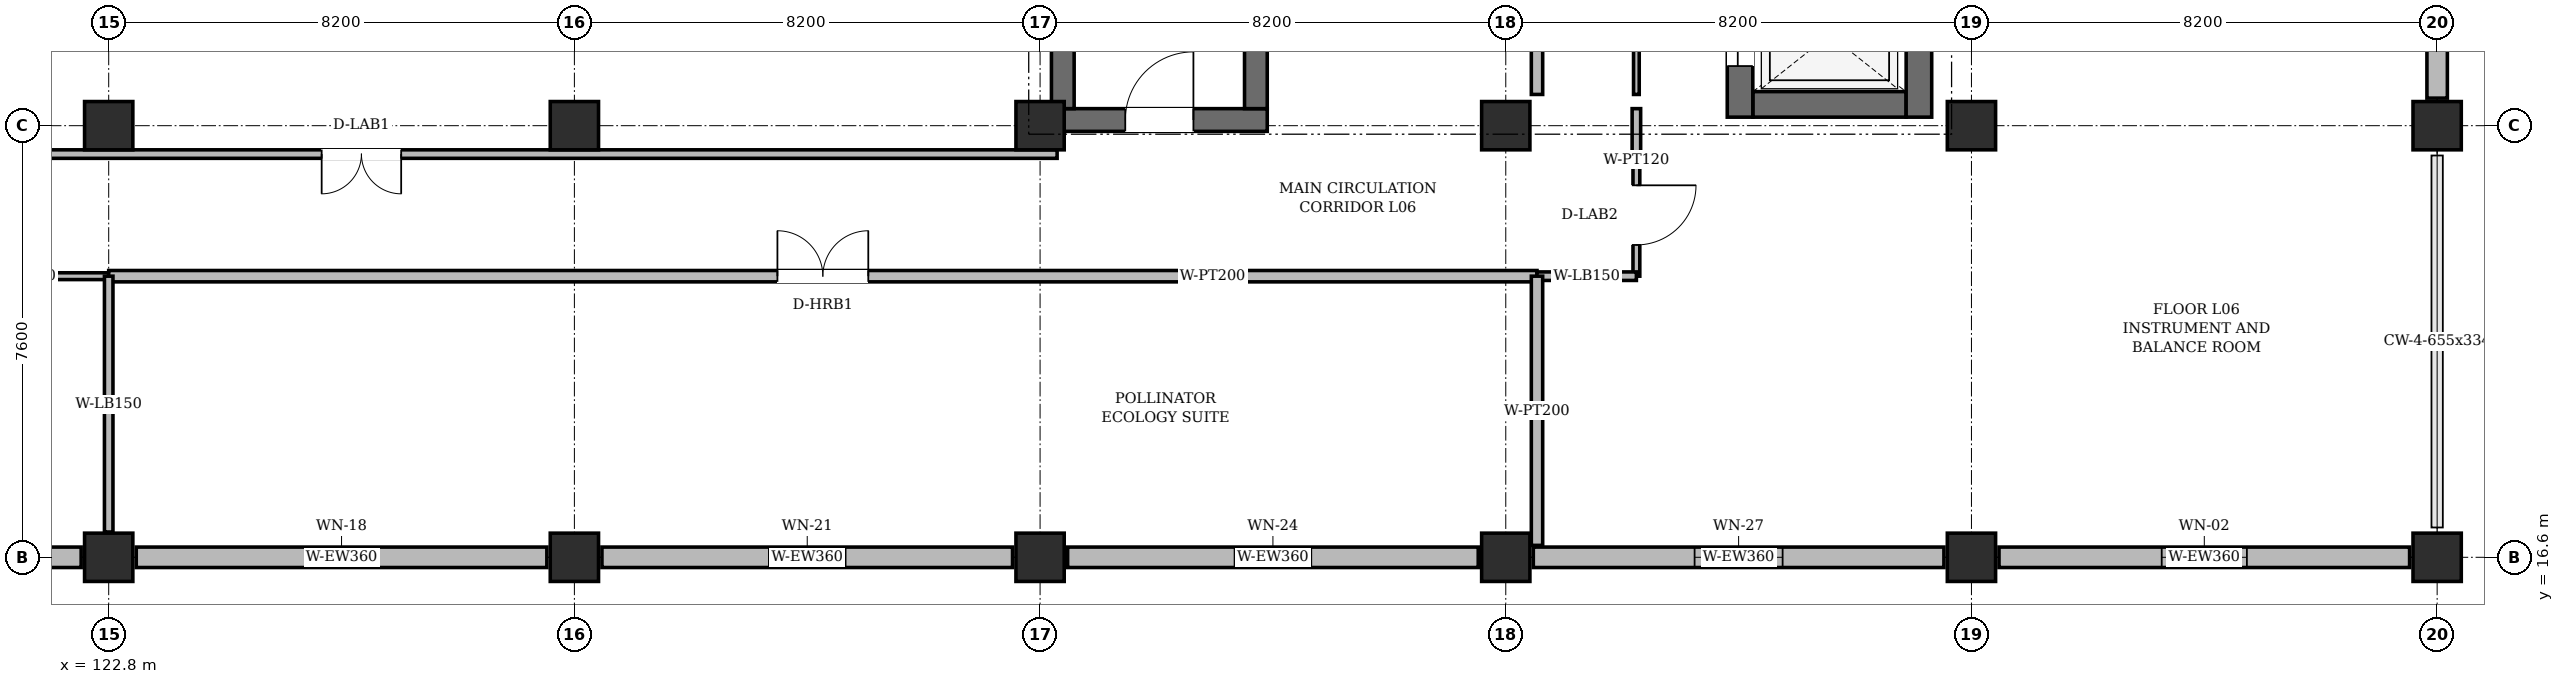
"""IFC4 building model, lengths in metres.
Left out: names, types, materials, properties, quantities, classifications, styles, units other than length and angle.
Written with IfcOpenShell. Run it as: python <this file> out.ifc"""

import sys

from ifc_helpers import new_model, si_unit, direction, frame, frame_2d, origin, origin_2d, place, context, subcontext, project, spatial, rectangle, extrude, element, fill, save


model = new_model("IFC4")
c1 = context("Model", 3, precision=1e-05, world=origin(), true_north=direction((0.0, 1.0)))
c2 = subcontext(c1, "Body", "Model", "MODEL_VIEW")
j1 = project(units=[si_unit("LENGTHUNIT", "METRE"), si_unit("PLANEANGLEUNIT", "RADIAN")], contexts=[c1])
p1 = place(None, origin())
s1 = spatial("IfcSite", under=j1, at=p1, CompositionType="ELEMENT")
p2 = place(p1, origin())
s2 = spatial("IfcBuilding", under=s1, at=p2, CompositionType="ELEMENT")
p3 = place(p2, frame((0.0, 0.0, 28.2)))
s3 = spatial("IfcBuildingStorey", under=s2, at=p3, CompositionType="ELEMENT", Elevation=28.2)
for number, where, z_axis, x_axis in (
    (1, (122.8, 16.6, 0.0), (0.0, 0.0, 1.0), (1.0, 0.0, 0.0)),
    (2, (122.8, 24.2, 0.0), (0.0, 0.0, 1.0), (1.0, 0.0, 0.0)),
    (3, (131.0, 16.6, 0.0), (0.0, 0.0, 1.0), (1.0, 0.0, 0.0)),
    (4, (131.0, 24.2, 0.0), (0.0, 0.0, 1.0), (1.0, 0.0, 0.0)),
    (5, (139.2, 16.6, 0.0), (0.0, 0.0, 1.0), (1.0, 0.0, 0.0)),
    (6, (139.2, 24.2, 0.0), (0.0, 0.0, 1.0), (1.0, 0.0, 0.0)),
    (7, (147.4, 16.6, 0.0), (0.0, 0.0, 1.0), (1.0, 0.0, 0.0)),
    (8, (147.4, 24.2, 0.0), (0.0, 0.0, 1.0), (1.0, 0.0, 0.0)),
    (9, (155.6, 16.6, 0.0), (0.0, 0.0, 1.0), (1.0, 0.0, 0.0)),
    (10, (155.6, 24.2, 0.0), (0.0, 0.0, 1.0), (1.0, 0.0, 0.0)),
    (11, (163.8, 16.6, 0.0), (0.0, 0.0, 1.0), (1.0, 0.0, 0.0)),
    (12, (163.8, 24.2, 0.0), (0.0, 0.0, 1.0), (1.0, 0.0, 0.0)),
):
    element("IfcColumn", number, at=place(p3, frame(where, z_axis=z_axis, x_axis=x_axis)), inside=s3, PredefinedType="COLUMN", context=c2, shape_type="SweptSolid", body=[
        extrude(rectangle(XDim=0.85, YDim=0.85, at=origin_2d()), origin(), (0.0, 0.0, 1.0), 3.94),
    ])
p4 = place(p3, frame((114.985, 16.6, 0.0), z_axis=(0.0, 0.0, 1.0), x_axis=(1.0, 0.0, 0.0)))
e13 = element("IfcWall", 13, at=p4, inside=s3, PredefinedType="SOLIDWALL", context=c2, shape_type="SweptSolid", body=[
    extrude(rectangle(XDim=7.33, YDim=0.36, at=frame_2d((3.665, 0.0))), origin(), (0.0, 0.0, 1.0), 3.325),
])
p5 = place(p4, frame((3.19, 0.0, 0.95)))
e14 = element("IfcOpeningElement", 14, at=p5, cuts=e13, PredefinedType="OPENING", context=c2, shape_type="SweptSolid", body=[
    extrude(rectangle(XDim=0.95, YDim=1.75, at=frame_2d((0.475, 0.875))), frame((0.0, 0.192, 0.0), z_axis=(0.0, -1.0, 0.0), x_axis=(1.0, 0.0, 0.0)), (0.0, 0.0, 1.0), 0.384),
])
p6 = place(p3, frame((123.285, 16.6, 0.0), z_axis=(0.0, 0.0, 1.0), x_axis=(1.0, 0.0, 0.0)))
e15 = element("IfcWall", 15, at=p6, inside=s3, PredefinedType="SOLIDWALL", context=c2, shape_type="SweptSolid", body=[
    extrude(rectangle(XDim=7.23, YDim=0.36, at=frame_2d((3.615, 0.0))), origin(), (0.0, 0.0, 1.0), 3.325),
])
p7 = place(p6, frame((3.04, 0.0, 0.95)))
e16 = element("IfcOpeningElement", 16, at=p7, cuts=e15, PredefinedType="OPENING", context=c2, shape_type="SweptSolid", body=[
    extrude(rectangle(XDim=1.15, YDim=1.5, at=frame_2d((0.575, 0.75))), frame((0.0, 0.192, 0.0), z_axis=(0.0, -1.0, 0.0), x_axis=(1.0, 0.0, 0.0)), (0.0, 0.0, 1.0), 0.384),
])
p8 = place(p3, frame((131.485, 16.6, 0.0), z_axis=(0.0, 0.0, 1.0), x_axis=(1.0, 0.0, 0.0)))
e17 = element("IfcWall", 17, at=p8, inside=s3, PredefinedType="SOLIDWALL", context=c2, shape_type="SweptSolid", body=[
    extrude(rectangle(XDim=7.23, YDim=0.36, at=frame_2d((3.615, 0.0))), origin(), (0.0, 0.0, 1.0), 3.325),
])
p9 = place(p8, frame((2.94, 0.0, 0.95)))
e18 = element("IfcOpeningElement", 18, at=p9, cuts=e17, PredefinedType="OPENING", context=c2, shape_type="SweptSolid", body=[
    extrude(rectangle(XDim=1.35, YDim=1.25, at=frame_2d((0.675, 0.625))), frame((0.0, 0.192, 0.0), z_axis=(0.0, -1.0, 0.0), x_axis=(1.0, 0.0, 0.0)), (0.0, 0.0, 1.0), 0.384),
])
p10 = place(p3, frame((139.685, 16.6, 0.0), z_axis=(0.0, 0.0, 1.0), x_axis=(1.0, 0.0, 0.0)))
e19 = element("IfcWall", 19, at=p10, inside=s3, PredefinedType="SOLIDWALL", context=c2, shape_type="SweptSolid", body=[
    extrude(rectangle(XDim=7.23, YDim=0.36, at=frame_2d((3.615, 0.0))), origin(), (0.0, 0.0, 1.0), 3.325),
])
p11 = place(p10, frame((2.94, 0.0, 0.95)))
e20 = element("IfcOpeningElement", 20, at=p11, cuts=e19, PredefinedType="OPENING", context=c2, shape_type="SweptSolid", body=[
    extrude(rectangle(XDim=1.35, YDim=2.05, at=frame_2d((0.675, 1.025))), frame((0.0, 0.192, 0.0), z_axis=(0.0, -1.0, 0.0), x_axis=(1.0, 0.0, 0.0)), (0.0, 0.0, 1.0), 0.384),
])
p12 = place(p3, frame((147.885, 16.6, 0.0), z_axis=(0.0, 0.0, 1.0), x_axis=(1.0, 0.0, 0.0)))
e21 = element("IfcWall", 21, at=p12, inside=s3, PredefinedType="SOLIDWALL", context=c2, shape_type="SweptSolid", body=[
    extrude(rectangle(XDim=7.23, YDim=0.36, at=frame_2d((3.615, 0.0))), origin(), (0.0, 0.0, 1.0), 3.325),
])
p13 = place(p12, frame((2.84, 0.0, 0.95)))
e22 = element("IfcOpeningElement", 22, at=p13, cuts=e21, PredefinedType="OPENING", context=c2, shape_type="SweptSolid", body=[
    extrude(rectangle(XDim=1.55, YDim=1.75, at=frame_2d((0.775, 0.875))), frame((0.0, 0.192, 0.0), z_axis=(0.0, -1.0, 0.0), x_axis=(1.0, 0.0, 0.0)), (0.0, 0.0, 1.0), 0.384),
])
p14 = place(p3, frame((156.085, 16.6, 0.0), z_axis=(0.0, 0.0, 1.0), x_axis=(1.0, 0.0, 0.0)))
e23 = element("IfcWall", 23, at=p14, inside=s3, PredefinedType="SOLIDWALL", context=c2, shape_type="SweptSolid", body=[
    extrude(rectangle(XDim=7.23, YDim=0.36, at=frame_2d((3.615, 0.0))), origin(), (0.0, 0.0, 1.0), 3.325),
])
p15 = place(p14, frame((2.865, 0.0, 0.95)))
e24 = element("IfcOpeningElement", 24, at=p15, cuts=e23, PredefinedType="OPENING", context=c2, shape_type="SweptSolid", body=[
    extrude(rectangle(XDim=1.5, YDim=2.1, at=frame_2d((0.75, 1.05))), frame((0.0, 0.192, 0.0), z_axis=(0.0, -1.0, 0.0), x_axis=(1.0, 0.0, 0.0)), (0.0, 0.0, 1.0), 0.384),
])
p16 = place(p3, frame((163.8, 24.685, 0.0), z_axis=(0.0, 0.0, 1.0), x_axis=(0.0, 1.0, 0.0)))
e25 = element("IfcWall", 25, at=p16, inside=s3, PredefinedType="SOLIDWALL", context=c2, shape_type="SweptSolid", body=[
    extrude(rectangle(XDim=6.63, YDim=0.36, at=frame_2d((3.315, 0.0))), origin(), (0.0, 0.0, 1.0), 3.325),
])
p17 = place(p16, frame((2.74, 0.0, 0.95)))
e26 = element("IfcOpeningElement", 26, at=p17, cuts=e25, PredefinedType="OPENING", context=c2, shape_type="SweptSolid", body=[
    extrude(rectangle(XDim=1.15, YDim=1.75, at=frame_2d((0.575, 0.875))), frame((0.0, 0.192, 0.0), z_axis=(0.0, -1.0, 0.0), x_axis=(1.0, 0.0, 0.0)), (0.0, 0.0, 1.0), 0.384),
])
p18 = place(p3, frame((139.4, 24.3, 0.0), z_axis=(0.0, 0.0, 1.0), x_axis=(1.0, 0.0, 0.0)))
e27 = element("IfcWall", 27, at=p18, inside=s3, PredefinedType="SHEAR", context=c2, shape_type="SweptSolid", body=[
    extrude(rectangle(XDim=3.8, YDim=0.4, at=frame_2d((1.9, 0.0))), origin(), (0.0, 0.0, 1.0), 3.94),
])
p19 = place(p18, frame((1.3, 0.0, 0.0)))
e28 = element("IfcOpeningElement", 28, at=p19, cuts=e27, PredefinedType="OPENING", context=c2, shape_type="SweptSolid", body=[
    extrude(rectangle(XDim=1.2, YDim=2.2, at=frame_2d((0.6, 1.1))), frame((0.0, 0.212, 0.0), z_axis=(0.0, -1.0, 0.0), x_axis=(1.0, 0.0, 0.0)), (0.0, 0.0, 1.0), 0.424),
])
for number, where, z_axis, x_axis in (
    (29, (139.6, 24.5, 0.0), (0.0, 0.0, 1.0), (0.0, 1.0, 0.0)),
    (30, (143.0, 24.5, 0.0), (0.0, 0.0, 1.0), (0.0, 1.0, 0.0)),
):
    element("IfcWall", number, at=place(p3, frame(where, z_axis=z_axis, x_axis=x_axis)), inside=s3, PredefinedType="SHEAR", context=c2, shape_type="SweptSolid", body=[
        extrude(rectangle(XDim=7.0, YDim=0.4, at=frame_2d((3.5, 0.0))), origin(), (0.0, 0.0, 1.0), 3.94),
    ])
p20 = place(p3, frame((151.75, 24.575, 0.0), z_axis=(0.0, 0.0, 1.0), x_axis=(1.0, 0.0, 0.0)))
e31 = element("IfcWall", 31, at=p20, inside=s3, PredefinedType="SHEAR", context=c2, shape_type="SweptSolid", body=[
    extrude(rectangle(XDim=2.7, YDim=0.45, at=frame_2d((1.35, 0.0))), origin(), (0.0, 0.0, 1.0), 3.94),
])
p21 = place(p3, frame((151.525, 24.35, 0.0), z_axis=(0.0, 0.0, 1.0), x_axis=(0.0, 1.0, 0.0)))
e32 = element("IfcWall", 32, at=p21, inside=s3, PredefinedType="SHEAR", context=c2, shape_type="SweptSolid", body=[
    extrude(rectangle(XDim=2.9, YDim=0.45, at=frame_2d((1.45, 0.0))), origin(), (0.0, 0.0, 1.0), 3.94),
])
p22 = place(p21, frame((0.9, 0.0, 0.0)))
e33 = element("IfcOpeningElement", 33, at=p22, cuts=e32, PredefinedType="OPENING", context=c2, shape_type="SweptSolid", body=[
    extrude(rectangle(XDim=1.1, YDim=2.2, at=frame_2d((0.55, 1.1))), frame((0.0, 0.237, 0.0), z_axis=(0.0, -1.0, 0.0), x_axis=(1.0, 0.0, 0.0)), (0.0, 0.0, 1.0), 0.474),
])
p23 = place(p3, frame((154.675, 24.35, 0.0), z_axis=(0.0, 0.0, 1.0), x_axis=(0.0, 1.0, 0.0)))
e34 = element("IfcWall", 34, at=p23, inside=s3, PredefinedType="SHEAR", context=c2, shape_type="SweptSolid", body=[
    extrude(rectangle(XDim=2.9, YDim=0.45, at=frame_2d((1.45, 0.0))), origin(), (0.0, 0.0, 1.0), 3.94),
])
p24 = place(p3, frame((147.95, 31.75, 0.0), z_axis=(0.0, 0.0, 1.0), x_axis=(0.0, -1.0, 0.0)))
e35 = element("IfcWall", 35, at=p24, inside=s3, PredefinedType="PARTITIONING", context=c2, shape_type="SweptSolid", body=[
    extrude(rectangle(XDim=7.0, YDim=0.2, at=frame_2d((3.5, 0.0))), origin(), (0.0, 0.0, 1.0), 3.805),
])
p25 = place(p24, frame((2.75, 0.0, 0.0)))
e36 = element("IfcOpeningElement", 36, at=p25, cuts=e35, PredefinedType="OPENING", context=c2, shape_type="SweptSolid", body=[
    extrude(rectangle(XDim=1.5, YDim=2.2, at=frame_2d((0.75, 1.1))), frame((0.0, 0.112, 0.0), z_axis=(0.0, -1.0, 0.0), x_axis=(1.0, 0.0, 0.0)), (0.0, 0.0, 1.0), 0.224),
])
p26 = place(p3, frame((149.7, 24.75, 0.0), z_axis=(0.0, 0.0, 1.0), x_axis=(0.0, 1.0, 0.0)))
e37 = element("IfcWall", 37, at=p26, inside=s3, PredefinedType="PARTITIONING", context=c2, shape_type="SweptSolid", body=[
    extrude(rectangle(XDim=11.3, YDim=0.1, at=frame_2d((5.65, 0.0))), origin(), (0.0, 0.0, 1.0), 3.805),
])
p27 = place(p26, frame((4.75, 0.0, 0.0)))
e38 = element("IfcOpeningElement", 38, at=p27, cuts=e37, PredefinedType="OPENING", context=c2, shape_type="SweptSolid", body=[
    extrude(rectangle(XDim=1.8, YDim=2.4, at=frame_2d((0.9, 1.2))), frame((0.0, 0.062, 0.0), z_axis=(0.0, -1.0, 0.0), x_axis=(1.0, 0.0, 0.0)), (0.0, 0.0, 1.0), 0.124),
])
p28 = place(p3, frame((122.8, 21.55, 0.0), z_axis=(0.0, 0.0, 1.0), x_axis=(-1.0, 0.0, 0.0)))
e39 = element("IfcWall", 39, at=p28, inside=s3, PredefinedType="PARTITIONING", context=c2, shape_type="SweptSolid", body=[
    extrude(rectangle(XDim=7.8, YDim=0.12, at=frame_2d((3.9, 0.0))), origin(), (0.0, 0.0, 1.0), 3.645),
])
p29 = place(p28, frame((3.375, 0.0, 0.0)))
e40 = element("IfcOpeningElement", 40, at=p29, cuts=e39, PredefinedType="OPENING", context=c2, shape_type="SweptSolid", body=[
    extrude(rectangle(XDim=1.05, YDim=2.2, at=frame_2d((0.525, 1.1))), frame((0.0, 0.072, 0.0), z_axis=(0.0, -1.0, 0.0), x_axis=(1.0, 0.0, 0.0)), (0.0, 0.0, 1.0), 0.144),
])
p30 = place(p3, frame((147.95, 21.55, 0.0), z_axis=(0.0, 0.0, 1.0), x_axis=(-1.0, 0.0, 0.0)))
e41 = element("IfcWall", 41, at=p30, inside=s3, PredefinedType="PARTITIONING", context=c2, shape_type="SweptSolid", body=[
    extrude(rectangle(XDim=25.15, YDim=0.2, at=frame_2d((12.575, 0.0))), origin(), (0.0, 0.0, 1.0), 3.515),
])
p31 = place(p30, frame((11.775, 0.0, 0.0)))
e42 = element("IfcOpeningElement", 42, at=p31, cuts=e41, PredefinedType="OPENING", context=c2, shape_type="SweptSolid", body=[
    extrude(rectangle(XDim=1.6, YDim=2.3, at=frame_2d((0.8, 1.15))), frame((0.0, 0.112, 0.0), z_axis=(0.0, -1.0, 0.0), x_axis=(1.0, 0.0, 0.0)), (0.0, 0.0, 1.0), 0.224),
])
p32 = place(p3, frame((149.7, 24.5, 0.0), z_axis=(0.0, 0.0, 1.0), x_axis=(0.0, -1.0, 0.0)))
e43 = element("IfcWall", 43, at=p32, inside=s3, PredefinedType="PARTITIONING", context=c2, shape_type="SweptSolid", body=[
    extrude(rectangle(XDim=0.8, YDim=0.15, at=frame_2d((0.4, 0.0))), origin(), (0.0, 0.0, 1.0), 3.805),
])
p33 = place(p3, frame((149.7, 23.7, 0.0), z_axis=(0.0, 0.0, 1.0), x_axis=(0.0, -1.0, 0.0)))
e44 = element("IfcWall", 44, at=p33, inside=s3, PredefinedType="PARTITIONING", context=c2, shape_type="SweptSolid", body=[
    extrude(rectangle(XDim=2.15, YDim=0.12, at=frame_2d((1.075, 0.0))), origin(), (0.0, 0.0, 1.0), 3.805),
])
p34 = place(p33, frame((0.55, 0.0, 0.0)))
e45 = element("IfcOpeningElement", 45, at=p34, cuts=e44, PredefinedType="OPENING", context=c2, shape_type="SweptSolid", body=[
    extrude(rectangle(XDim=1.05, YDim=2.2, at=frame_2d((0.525, 1.1))), frame((0.0, 0.072, 0.0), z_axis=(0.0, -1.0, 0.0), x_axis=(1.0, 0.0, 0.0)), (0.0, 0.0, 1.0), 0.144),
])
p35 = place(p3, frame((149.7, 21.55, 0.0), z_axis=(0.0, 0.0, 1.0), x_axis=(-1.0, 0.0, 0.0)))
e46 = element("IfcWall", 46, at=p35, inside=s3, PredefinedType="PARTITIONING", context=c2, shape_type="SweptSolid", body=[
    extrude(rectangle(XDim=1.75, YDim=0.15, at=frame_2d((0.875, 0.0))), origin(), (0.0, 0.0, 1.0), 3.515),
])
p36 = place(p3, frame((115.0, 23.7, 0.0), z_axis=(0.0, 0.0, 1.0), x_axis=(1.0, 0.0, 0.0)))
e47 = element("IfcWall", 47, at=p36, inside=s3, PredefinedType="PARTITIONING", context=c2, shape_type="SweptSolid", body=[
    extrude(rectangle(XDim=24.5, YDim=0.15, at=frame_2d((12.25, 0.0))), origin(), (0.0, 0.0, 1.0), 3.805),
])
p37 = place(p36, frame((11.55, 0.0, 0.0)))
e48 = element("IfcOpeningElement", 48, at=p37, cuts=e47, PredefinedType="OPENING", context=c2, shape_type="SweptSolid", body=[
    extrude(rectangle(XDim=1.4, YDim=2.2, at=frame_2d((0.7, 1.1))), frame((0.0, 0.087, 0.0), z_axis=(0.0, -1.0, 0.0), x_axis=(1.0, 0.0, 0.0)), (0.0, 0.0, 1.0), 0.174),
])
p38 = place(p3, frame((122.8, 21.55, 0.0), z_axis=(0.0, 0.0, 1.0), x_axis=(0.0, -1.0, 0.0)))
e49 = element("IfcWall", 49, at=p38, inside=s3, PredefinedType="PARTITIONING", context=c2, shape_type="SweptSolid", body=[
    extrude(rectangle(XDim=4.505, YDim=0.15, at=frame_2d((2.252, 0.0))), origin(), (0.0, 0.0, 1.0), 3.275),
])
p39 = place(p3, frame((147.95, 21.55, 0.0), z_axis=(0.0, 0.0, 1.0), x_axis=(0.0, -1.0, 0.0)))
e50 = element("IfcWall", 50, at=p39, inside=s3, PredefinedType="PARTITIONING", context=c2, shape_type="SweptSolid", body=[
    extrude(rectangle(XDim=4.74, YDim=0.2, at=frame_2d((2.37, 0.0))), origin(), (0.0, 0.0, 1.0), 3.805),
])
p40 = place(p7, origin())
e51 = element("IfcWindow", 51, at=p40, inside=s3, PartitioningType="SINGLE_PANEL", PredefinedType="WINDOW", context=c2, shape_type="SweptSolid", body=[
    extrude(rectangle(XDim=1.15, YDim=1.5, at=frame_2d((0.575, 0.75))), frame((0.0, 0.03, 0.0), z_axis=(0.0, -1.0, 0.0), x_axis=(1.0, 0.0, 0.0)), (0.0, 0.0, 1.0), 0.06),
])
fill(e16, e51)
p41 = place(p9, origin())
e52 = element("IfcWindow", 52, at=p41, inside=s3, PartitioningType="SINGLE_PANEL", PredefinedType="WINDOW", context=c2, shape_type="SweptSolid", body=[
    extrude(rectangle(XDim=1.35, YDim=1.25, at=frame_2d((0.675, 0.625))), frame((0.0, 0.03, 0.0), z_axis=(0.0, -1.0, 0.0), x_axis=(1.0, 0.0, 0.0)), (0.0, 0.0, 1.0), 0.06),
])
fill(e18, e52)
p42 = place(p11, origin())
e53 = element("IfcWindow", 53, at=p42, inside=s3, PartitioningType="SINGLE_PANEL", PredefinedType="WINDOW", context=c2, shape_type="SweptSolid", body=[
    extrude(rectangle(XDim=1.35, YDim=2.05, at=frame_2d((0.675, 1.025))), frame((0.0, 0.03, 0.0), z_axis=(0.0, -1.0, 0.0), x_axis=(1.0, 0.0, 0.0)), (0.0, 0.0, 1.0), 0.06),
])
fill(e20, e53)
p43 = place(p13, origin())
e54 = element("IfcWindow", 54, at=p43, inside=s3, PartitioningType="DOUBLE_PANEL_VERTICAL", PredefinedType="WINDOW", context=c2, shape_type="SweptSolid", body=[
    extrude(rectangle(XDim=1.55, YDim=1.75, at=frame_2d((0.775, 0.875))), frame((0.0, 0.03, 0.0), z_axis=(0.0, -1.0, 0.0), x_axis=(1.0, 0.0, 0.0)), (0.0, 0.0, 1.0), 0.06),
])
fill(e22, e54)
p44 = place(p15, origin())
e55 = element("IfcWindow", 55, at=p44, inside=s3, PartitioningType="DOUBLE_PANEL_VERTICAL", PredefinedType="WINDOW", context=c2, shape_type="SweptSolid", body=[
    extrude(rectangle(XDim=1.5, YDim=2.1, at=frame_2d((0.75, 1.05))), frame((0.0, 0.03, 0.0), z_axis=(0.0, -1.0, 0.0), x_axis=(1.0, 0.0, 0.0)), (0.0, 0.0, 1.0), 0.06),
])
fill(e24, e55)
p45 = place(p19, origin())
e56 = element("IfcDoor", 56, at=p45, inside=s3, OperationType="SINGLE_SWING_RIGHT", PredefinedType="DOOR", context=c2, shape_type="SweptSolid", body=[
    extrude(rectangle(XDim=1.2, YDim=2.2, at=frame_2d((0.6, 1.1))), frame((0.0, 0.025, 0.0), z_axis=(0.0, -1.0, 0.0), x_axis=(1.0, 0.0, 0.0)), (0.0, 0.0, 1.0), 0.05),
])
fill(e28, e56)
p46 = place(p22, origin())
e57 = element("IfcDoor", 57, at=p46, inside=s3, OperationType="DOUBLE_DOOR_SLIDING", PredefinedType="DOOR", context=c2, shape_type="SweptSolid", body=[
    extrude(rectangle(XDim=1.1, YDim=2.2, at=frame_2d((0.55, 1.1))), frame((0.0, 0.025, 0.0), z_axis=(0.0, -1.0, 0.0), x_axis=(1.0, 0.0, 0.0)), (0.0, 0.0, 1.0), 0.05),
])
fill(e33, e57)
p47 = place(p31, frame((1.6, 0.0, 0.0), z_axis=(0.0, 0.0, 1.0), x_axis=(-1.0, 0.0, 0.0)))
e58 = element("IfcDoor", 58, at=p47, inside=s3, OperationType="DOUBLE_DOOR_SINGLE_SWING", PredefinedType="DOOR", context=c2, shape_type="SweptSolid", body=[
    extrude(rectangle(XDim=1.6, YDim=2.3, at=frame_2d((0.8, 1.15))), frame((0.0, 0.025, 0.0), z_axis=(0.0, -1.0, 0.0), x_axis=(1.0, 0.0, 0.0)), (0.0, 0.0, 1.0), 0.05),
])
fill(e42, e58)
p48 = place(p34, origin())
e59 = element("IfcDoor", 59, at=p48, inside=s3, OperationType="SINGLE_SWING_LEFT", PredefinedType="DOOR", context=c2, shape_type="SweptSolid", body=[
    extrude(rectangle(XDim=1.05, YDim=2.2, at=frame_2d((0.525, 1.1))), frame((0.0, 0.025, 0.0), z_axis=(0.0, -1.0, 0.0), x_axis=(1.0, 0.0, 0.0)), (0.0, 0.0, 1.0), 0.05),
])
fill(e45, e59)
p49 = place(p37, frame((1.4, 0.0, 0.0), z_axis=(0.0, 0.0, 1.0), x_axis=(-1.0, 0.0, 0.0)))
e60 = element("IfcDoor", 60, at=p49, inside=s3, OperationType="DOUBLE_DOOR_SINGLE_SWING", PredefinedType="DOOR", context=c2, shape_type="SweptSolid", body=[
    extrude(rectangle(XDim=1.4, YDim=2.2, at=frame_2d((0.7, 1.1))), frame((0.0, 0.025, 0.0), z_axis=(0.0, -1.0, 0.0), x_axis=(1.0, 0.0, 0.0)), (0.0, 0.0, 1.0), 0.05),
])
fill(e48, e60)
save(model, sys.argv[1])
